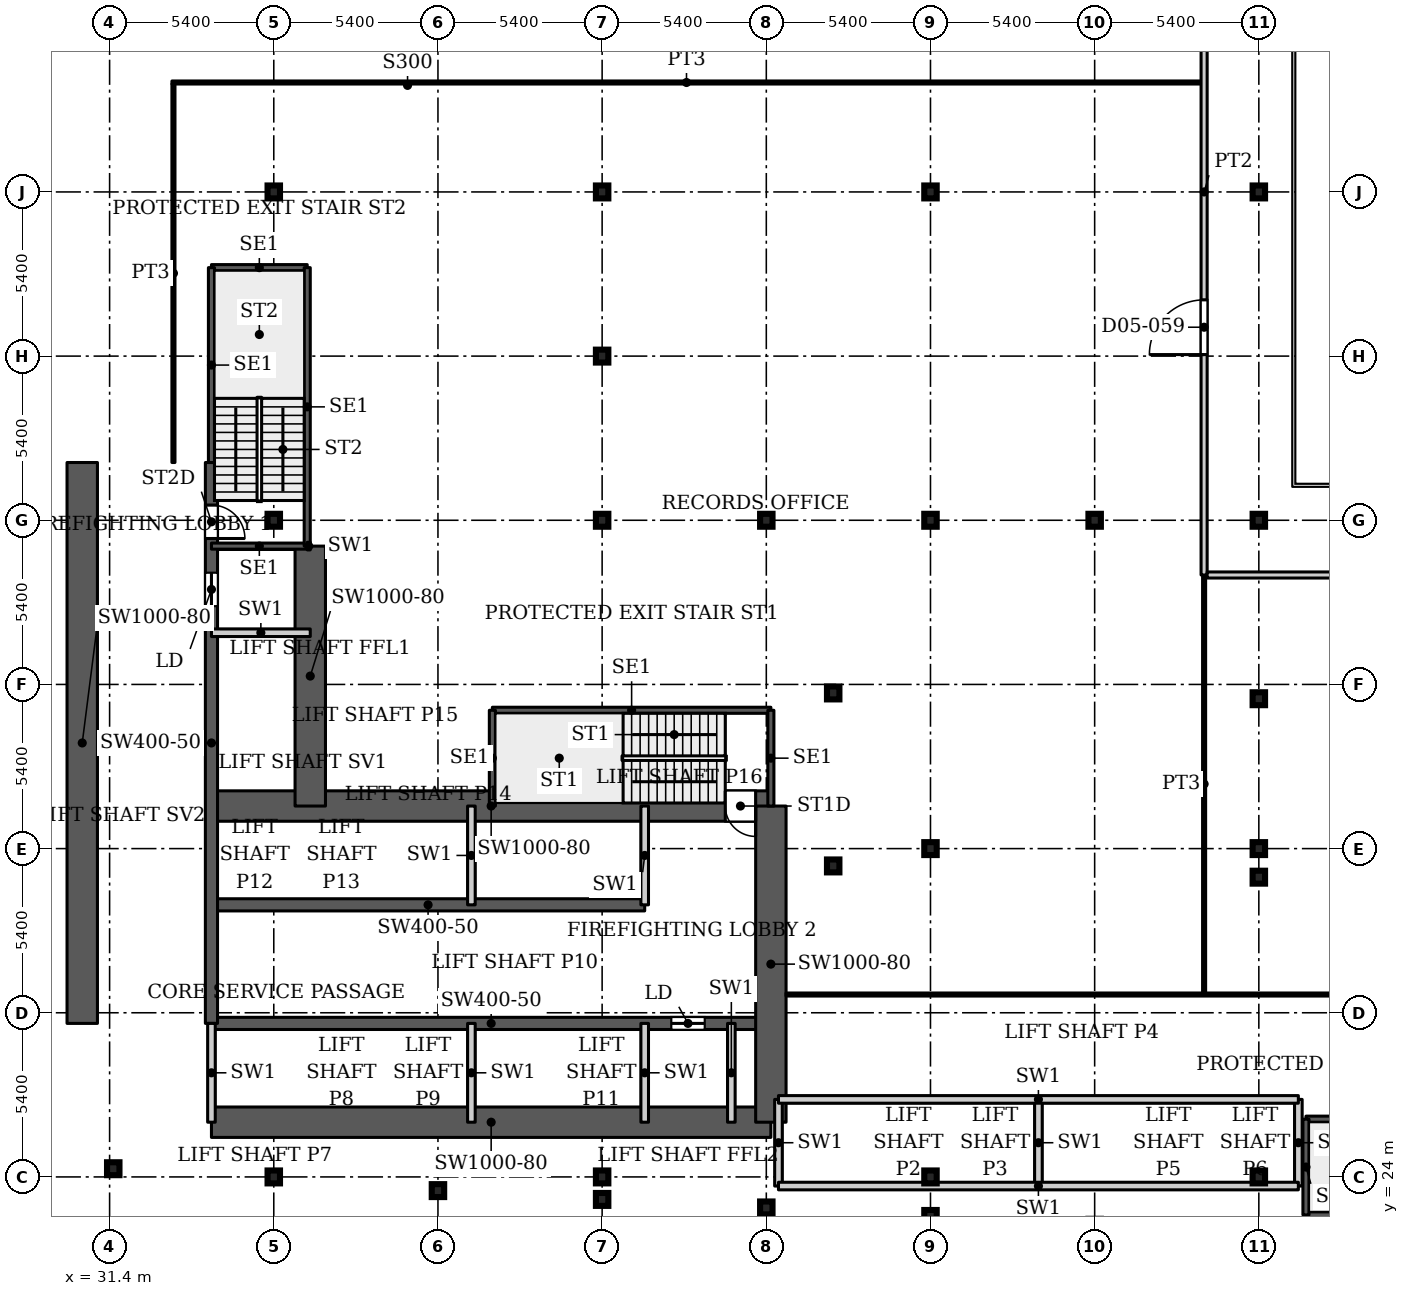
"""IFC4 building model, lengths in metres.
Left out: names, types, materials, properties, quantities, classifications, styles, units other than length and angle.
Written with IfcOpenShell. Run it as: python <this file> out.ifc"""

import sys

from ifc_helpers import new_model, si_unit, direction, frame, frame_2d, origin, origin_2d, place, context, subcontext, project, spatial, rectangle, i_section, extrude, source, transform, mapped, element, fill, save


model = new_model("IFC4")
c1 = context("Model", 3, precision=1e-05, world=origin(), true_north=direction((0.0, 1.0)))
c2 = subcontext(c1, "Body", "Model", "MODEL_VIEW")
j1 = project(units=[si_unit("LENGTHUNIT", "METRE"), si_unit("PLANEANGLEUNIT", "RADIAN")], contexts=[c1])
p1 = place(None, origin())
s1 = spatial("IfcSite", under=j1, at=p1, CompositionType="ELEMENT")
p2 = place(p1, origin())
s2 = spatial("IfcBuilding", under=s1, at=p2, CompositionType="ELEMENT")
p3 = place(p2, frame((0.0, 0.0, 26.0)))
s3 = spatial("IfcBuildingStorey", under=s2, at=p3, CompositionType="ELEMENT", Elevation=26.0)
for number, where, z_axis, x_axis in (
    (1, (36.8, 24.0, 0.0), (0.0, 0.0, 1.0), (1.0, 0.0, 0.0)),
    (2, (47.6, 24.0, 0.0), (0.0, 0.0, 1.0), (1.0, 0.0, 0.0)),
    (3, (58.4, 24.0, 0.0), (0.0, 0.0, 1.0), (1.0, 0.0, 0.0)),
    (4, (69.2, 24.0, 0.0), (0.0, 0.0, 1.0), (1.0, 0.0, 0.0)),
    (5, (58.4, 34.8, 0.0), (0.0, 0.0, 1.0), (1.0, 0.0, 0.0)),
    (6, (69.2, 34.8, 0.0), (0.0, 0.0, 1.0), (1.0, 0.0, 0.0)),
    (7, (36.8, 45.6, 0.0), (0.0, 0.0, 1.0), (1.0, 0.0, 0.0)),
    (8, (47.6, 45.6, 0.0), (0.0, 0.0, 1.0), (1.0, 0.0, 0.0)),
    (9, (58.4, 45.6, 0.0), (0.0, 0.0, 1.0), (1.0, 0.0, 0.0)),
    (10, (69.2, 45.6, 0.0), (0.0, 0.0, 1.0), (1.0, 0.0, 0.0)),
    (11, (36.8, 56.4, 0.0), (0.0, 0.0, 1.0), (1.0, 0.0, 0.0)),
    (12, (47.6, 56.4, 0.0), (0.0, 0.0, 1.0), (1.0, 0.0, 0.0)),
    (13, (58.4, 56.4, 0.0), (0.0, 0.0, 1.0), (1.0, 0.0, 0.0)),
    (14, (69.2, 56.4, 0.0), (0.0, 0.0, 1.0), (1.0, 0.0, 0.0)),
    (15, (58.4, 22.7, 0.0), (0.0, 0.0, 1.0), (1.0, 0.0, 0.0)),
    (16, (53.0, 22.98, 0.0), (0.0, 0.0, 1.0), (1.0, 0.0, 0.0)),
    (17, (47.6, 23.26, 0.0), (0.0, 0.0, 1.0), (1.0, 0.0, 0.0)),
    (18, (42.2, 23.55, 0.0), (0.0, 0.0, 1.0), (1.0, 0.0, 0.0)),
    (19, (31.52, 24.27, 0.0), (0.0, 0.0, 1.0), (1.0, 0.0, 0.0)),
    (20, (53.0, 45.6, 0.0), (0.0, 0.0, 1.0), (1.0, 0.0, 0.0)),
    (21, (63.8, 45.6, 0.0), (0.0, 0.0, 1.0), (1.0, 0.0, 0.0)),
    (22, (47.6, 51.0, 0.0), (0.0, 0.0, 1.0), (1.0, 0.0, 0.0)),
    (23, (69.2, 33.86, 0.0), (0.0, 0.0, 1.0), (1.0, 0.0, 0.0)),
    (24, (55.2, 34.23, 0.0), (0.0, 0.0, 1.0), (1.0, 0.0, 0.0)),
    (25, (69.2, 39.73, 0.0), (0.0, 0.0, 1.0), (1.0, 0.0, 0.0)),
    (26, (55.2, 39.92, 0.0), (0.0, 0.0, 1.0), (1.0, 0.0, 0.0)),
):
    element("IfcColumn", number, at=place(p3, frame(where, z_axis=z_axis, x_axis=x_axis)), inside=s3, PredefinedType="COLUMN", context=c2, shape_type="SweptSolid", body=[
        extrude(i_section(OverallWidth=0.409, OverallDepth=0.425, WebThickness=0.033, FlangeThickness=0.052, FilletRadius=0.013, at=origin_2d()), origin(), (0.0, 0.0, 1.0), 4.5),
    ])
p4 = place(p3, frame((34.75, 25.8, 0.0), z_axis=(0.0, 0.0, 1.0), x_axis=(1.0, 0.0, 0.0)))
e27 = element("IfcWall", 27, at=p4, inside=s3, PredefinedType="SHEAR", context=c2, shape_type="SweptSolid", body=[
    extrude(rectangle(XDim=18.4, YDim=1.0, at=frame_2d((9.2, 0.0))), origin(), (0.0, 0.0, 1.0), 4.5),
])
p5 = place(p3, frame((34.75, 29.05, 0.0), z_axis=(0.0, 0.0, 1.0), x_axis=(1.0, 0.0, 0.0)))
e28 = element("IfcWall", 28, at=p5, inside=s3, PredefinedType="SHEAR", context=c2, shape_type="SweptSolid", body=[
    extrude(rectangle(XDim=18.4, YDim=0.4, at=frame_2d((9.2, 0.0))), origin(), (0.0, 0.0, 1.0), 4.5),
])
p6 = place(p5, frame((15.125, 0.0, 0.0)))
e29 = element("IfcOpeningElement", 29, at=p6, cuts=e28, PredefinedType="OPENING", context=c2, shape_type="SweptSolid", body=[
    extrude(rectangle(XDim=1.1, YDim=2.2, at=frame_2d((0.55, 1.1))), frame((0.0, 0.21, 0.0), z_axis=(0.0, -1.0, 0.0), x_axis=(1.0, 0.0, 0.0)), (0.0, 0.0, 1.0), 0.42),
])
p7 = place(p3, frame((34.75, 32.95, 0.0), z_axis=(0.0, 0.0, 1.0), x_axis=(1.0, 0.0, 0.0)))
e30 = element("IfcWall", 30, at=p7, inside=s3, PredefinedType="SHEAR", context=c2, shape_type="SweptSolid", body=[
    extrude(rectangle(XDim=14.25, YDim=0.4, at=frame_2d((7.125, 0.0))), origin(), (0.0, 0.0, 1.0), 4.5),
])
p8 = place(p3, frame((34.75, 36.2, 0.0), z_axis=(0.0, 0.0, 1.0), x_axis=(1.0, 0.0, 0.0)))
e31 = element("IfcWall", 31, at=p8, inside=s3, PredefinedType="SHEAR", context=c2, shape_type="SweptSolid", body=[
    extrude(rectangle(XDim=18.4, YDim=1.0, at=frame_2d((9.2, 0.0))), origin(), (0.0, 0.0, 1.0), 4.5),
])
p9 = place(p8, frame((16.9, 0.0, 0.0)))
e32 = element("IfcOpeningElement", 32, at=p9, cuts=e31, PredefinedType="OPENING", context=c2, shape_type="SweptSolid", body=[
    extrude(rectangle(XDim=1.0, YDim=2.2, at=frame_2d((0.5, 1.1))), frame((0.0, 0.51, 0.0), z_axis=(0.0, -1.0, 0.0), x_axis=(1.0, 0.0, 0.0)), (0.0, 0.0, 1.0), 1.02),
])
p10 = place(p3, frame((34.75, 29.05, 0.0), z_axis=(0.0, 0.0, 1.0), x_axis=(0.0, 1.0, 0.0)))
e33 = element("IfcWall", 33, at=p10, inside=s3, PredefinedType="SHEAR", context=c2, shape_type="SweptSolid", body=[
    extrude(rectangle(XDim=18.45, YDim=0.4, at=frame_2d((9.225, 0.0))), origin(), (0.0, 0.0, 1.0), 4.5),
])
p11 = place(p10, frame((13.725, 0.0, 0.0)))
e34 = element("IfcOpeningElement", 34, at=p11, cuts=e33, PredefinedType="OPENING", context=c2, shape_type="SweptSolid", body=[
    extrude(rectangle(XDim=1.1, YDim=2.2, at=frame_2d((0.55, 1.1))), frame((0.0, 0.21, 0.0), z_axis=(0.0, -1.0, 0.0), x_axis=(1.0, 0.0, 0.0)), (0.0, 0.0, 1.0), 0.42),
])
p12 = place(p10, frame((15.95, 0.0, 0.0)))
e35 = element("IfcOpeningElement", 35, at=p12, cuts=e33, PredefinedType="OPENING", context=c2, shape_type="SweptSolid", body=[
    extrude(rectangle(XDim=1.1, YDim=2.2, at=frame_2d((0.55, 1.1))), frame((0.0, 0.21, 0.0), z_axis=(0.0, -1.0, 0.0), x_axis=(1.0, 0.0, 0.0)), (0.0, 0.0, 1.0), 0.42),
])
p13 = place(p3, frame((38.0, 36.2, 0.0), z_axis=(0.0, 0.0, 1.0), x_axis=(0.0, 1.0, 0.0)))
e36 = element("IfcWall", 36, at=p13, inside=s3, PredefinedType="SHEAR", context=c2, shape_type="SweptSolid", body=[
    extrude(rectangle(XDim=8.55, YDim=1.0, at=frame_2d((4.275, 0.0))), origin(), (0.0, 0.0, 1.0), 4.5),
])
p14 = place(p3, frame((30.5, 29.05, 0.0), z_axis=(0.0, 0.0, 1.0), x_axis=(0.0, 1.0, 0.0)))
e37 = element("IfcWall", 37, at=p14, inside=s3, PredefinedType="SHEAR", context=c2, shape_type="SweptSolid", body=[
    extrude(rectangle(XDim=18.45, YDim=1.0, at=frame_2d((9.225, 0.0))), origin(), (0.0, 0.0, 1.0), 4.5),
])
p15 = place(p3, frame((53.15, 25.8, 0.0), z_axis=(0.0, 0.0, 1.0), x_axis=(0.0, 1.0, 0.0)))
e38 = element("IfcWall", 38, at=p15, inside=s3, PredefinedType="SHEAR", context=c2, shape_type="SweptSolid", body=[
    extrude(rectangle(XDim=10.4, YDim=1.0, at=frame_2d((5.2, 0.0))), origin(), (0.0, 0.0, 1.0), 4.5),
])
p16 = place(p3, frame((43.99, 39.35, 0.0), z_axis=(0.0, 0.0, 1.0), x_axis=(1.0, 0.0, 0.0)))
e39 = element("IfcWall", 39, at=p16, inside=s3, PredefinedType="SHEAR", context=c2, shape_type="SweptSolid", body=[
    extrude(rectangle(XDim=9.16, YDim=0.2, at=frame_2d((4.58, 0.0))), origin(), (0.0, 0.0, 1.0), 4.5),
])
for number, where, z_axis, x_axis in (
    (40, (43.99, 36.2, 0.0), (0.0, 0.0, 1.0), (0.0, 1.0, 0.0)),
    (41, (53.15, 36.2, 0.0), (0.0, 0.0, 1.0), (0.0, 1.0, 0.0)),
):
    element("IfcWall", number, at=place(p3, frame(where, z_axis=z_axis, x_axis=x_axis)), inside=s3, PredefinedType="SHEAR", context=c2, shape_type="SweptSolid", body=[
        extrude(rectangle(XDim=3.15, YDim=0.2, at=frame_2d((1.575, 0.0))), origin(), (0.0, 0.0, 1.0), 4.5),
    ])
for number, where, z_axis, x_axis in (
    (42, (34.75, 44.75, 0.0), (0.0, 0.0, 1.0), (1.0, 0.0, 0.0)),
    (43, (34.75, 53.91, 0.0), (0.0, 0.0, 1.0), (1.0, 0.0, 0.0)),
):
    element("IfcWall", number, at=place(p3, frame(where, z_axis=z_axis, x_axis=x_axis)), inside=s3, PredefinedType="SHEAR", context=c2, shape_type="SweptSolid", body=[
        extrude(rectangle(XDim=3.15, YDim=0.2, at=frame_2d((1.575, 0.0))), origin(), (0.0, 0.0, 1.0), 4.5),
    ])
p17 = place(p3, frame((34.75, 47.5, 0.0), z_axis=(0.0, 0.0, 1.0), x_axis=(0.0, 1.0, 0.0)))
e44 = element("IfcWall", 44, at=p17, inside=s3, PredefinedType="SHEAR", context=c2, shape_type="SweptSolid", body=[
    extrude(rectangle(XDim=6.41, YDim=0.2, at=frame_2d((3.205, 0.0))), origin(), (0.0, 0.0, 1.0), 4.5),
])
for number, where, z_axis, x_axis in (
    (45, (37.9, 44.75, 0.0), (0.0, 0.0, 1.0), (0.0, 1.0, 0.0)),
    (46, (70.75, 22.75, 0.0), (0.0, 0.0, 1.0), (1.0, 0.0, 0.0)),
    (47, (70.75, 25.9, 0.0), (0.0, 0.0, 1.0), (1.0, 0.0, 0.0)),
):
    element("IfcWall", number, at=place(p3, frame(where, z_axis=z_axis, x_axis=x_axis)), inside=s3, PredefinedType="SHEAR", context=c2, shape_type="SweptSolid", body=[
        extrude(rectangle(XDim=9.16, YDim=0.2, at=frame_2d((4.58, 0.0))), origin(), (0.0, 0.0, 1.0), 4.5),
    ])
p18 = place(p3, frame((70.75, 22.75, 0.0), z_axis=(0.0, 0.0, 1.0), x_axis=(0.0, 1.0, 0.0)))
e48 = element("IfcWall", 48, at=p18, inside=s3, PredefinedType="SHEAR", context=c2, shape_type="SweptSolid", body=[
    extrude(rectangle(XDim=3.15, YDim=0.2, at=frame_2d((1.575, 0.0))), origin(), (0.0, 0.0, 1.0), 4.5),
])
for number, where, z_axis, x_axis in (
    (49, (34.75, 25.8, 0.0), (0.0, 0.0, 1.0), (0.0, 1.0, 0.0)),
    (50, (43.3, 25.8, 0.0), (0.0, 0.0, 1.0), (0.0, 1.0, 0.0)),
    (51, (43.3, 32.95, 0.0), (0.0, 0.0, 1.0), (0.0, 1.0, 0.0)),
    (52, (49.0, 25.8, 0.0), (0.0, 0.0, 1.0), (0.0, 1.0, 0.0)),
    (53, (49.0, 32.95, 0.0), (0.0, 0.0, 1.0), (0.0, 1.0, 0.0)),
    (54, (51.85, 25.8, 0.0), (0.0, 0.0, 1.0), (0.0, 1.0, 0.0)),
):
    element("IfcWall", number, at=place(p3, frame(where, z_axis=z_axis, x_axis=x_axis)), inside=s3, PredefinedType="PARTITIONING", context=c2, shape_type="SweptSolid", body=[
        extrude(rectangle(XDim=3.25, YDim=0.25, at=frame_2d((1.625, 0.0))), origin(), (0.0, 0.0, 1.0), 4.5),
    ])
for number, where, z_axis, x_axis in (
    (55, (53.4, 23.7, 0.0), (0.0, 0.0, 1.0), (0.0, 1.0, 0.0)),
    (56, (61.95, 23.7, 0.0), (0.0, 0.0, 1.0), (0.0, 1.0, 0.0)),
    (57, (70.5, 23.7, 0.0), (0.0, 0.0, 1.0), (0.0, 1.0, 0.0)),
):
    element("IfcWall", number, at=place(p3, frame(where, z_axis=z_axis, x_axis=x_axis)), inside=s3, PredefinedType="PARTITIONING", context=c2, shape_type="SweptSolid", body=[
        extrude(rectangle(XDim=2.85, YDim=0.25, at=frame_2d((1.425, 0.0))), origin(), (0.0, 0.0, 1.0), 4.5),
    ])
for number, where, z_axis, x_axis in (
    (58, (53.4, 23.7, 0.0), (0.0, 0.0, 1.0), (1.0, 0.0, 0.0)),
    (59, (53.4, 26.55, 0.0), (0.0, 0.0, 1.0), (1.0, 0.0, 0.0)),
):
    element("IfcWall", number, at=place(p3, frame(where, z_axis=z_axis, x_axis=x_axis)), inside=s3, PredefinedType="PARTITIONING", context=c2, shape_type="SweptSolid", body=[
        extrude(rectangle(XDim=17.1, YDim=0.25, at=frame_2d((8.55, 0.0))), origin(), (0.0, 0.0, 1.0), 4.5),
    ])
p19 = place(p3, frame((34.75, 41.9, 0.0), z_axis=(0.0, 0.0, 1.0), x_axis=(1.0, 0.0, 0.0)))
e60 = element("IfcWall", 60, at=p19, inside=s3, PredefinedType="PARTITIONING", context=c2, shape_type="SweptSolid", body=[
    extrude(rectangle(XDim=3.25, YDim=0.25, at=frame_2d((1.625, 0.0))), origin(), (0.0, 0.0, 1.0), 4.5),
])
p20 = place(p3, frame((37.9, 44.75, 0.0), z_axis=(0.0, 0.0, 1.0), x_axis=(1.0, 0.0, 0.0)))
e61 = element("IfcWall", 61, at=p20, inside=s3, PredefinedType="PARTITIONING", context=c2, shape_type="SweptSolid", body=[
    extrude(rectangle(XDim=0.1, YDim=0.25, at=frame_2d((0.05, 0.0))), origin(), (0.0, 0.0, 1.0), 4.5),
])
p21 = place(p3, frame((33.45, 60.0, 0.0), z_axis=(0.0, 0.0, 1.0), x_axis=(1.0, 0.0, 0.0)))
e62 = element("IfcWall", 62, at=p21, inside=s3, PredefinedType="PARTITIONING", context=c2, shape_type="SweptSolid", body=[
    extrude(rectangle(XDim=33.85, YDim=0.1, at=frame_2d((16.925, 0.0))), origin(), (0.0, 0.0, 1.0), 4.2),
])
p22 = place(p3, frame((33.5, 47.5, 0.0), z_axis=(0.0, 0.0, 1.0), x_axis=(0.0, 1.0, 0.0)))
e63 = element("IfcWall", 63, at=p22, inside=s3, PredefinedType="PARTITIONING", context=c2, shape_type="SweptSolid", body=[
    extrude(rectangle(XDim=12.45, YDim=0.1, at=frame_2d((6.225, 0.0))), origin(), (0.0, 0.0, 1.0), 4.2),
])
p23 = place(p3, frame((53.649, 30.0, 0.0), z_axis=(0.0, 0.0, 1.0), x_axis=(1.0, 0.0, 0.0)))
e64 = element("IfcWall", 64, at=p23, inside=s3, PredefinedType="PARTITIONING", context=c2, shape_type="SweptSolid", body=[
    extrude(rectangle(XDim=38.301, YDim=0.1, at=frame_2d((19.15, 0.0))), origin(), (0.0, 0.0, 1.0), 4.2),
])
p24 = place(p3, frame((67.4, 30.05, 0.0), z_axis=(0.0, 0.0, 1.0), x_axis=(0.0, 1.0, 0.0)))
e65 = element("IfcWall", 65, at=p24, inside=s3, PredefinedType="PARTITIONING", context=c2, shape_type="SweptSolid", body=[
    extrude(rectangle(XDim=13.75, YDim=0.1, at=frame_2d((6.875, 0.0))), origin(), (0.0, 0.0, 1.0), 4.2),
])
p25 = place(p3, frame((67.4, 43.8, 0.0), z_axis=(0.0, 0.0, 1.0), x_axis=(0.0, 1.0, 0.0)))
e66 = element("IfcWall", 66, at=p25, inside=s3, PredefinedType="PARTITIONING", context=c2, shape_type="SweptSolid", body=[
    extrude(rectangle(XDim=25.2, YDim=0.2, at=frame_2d((12.6, 0.0))), origin(), (0.0, 0.0, 1.0), 4.2),
])
p26 = place(p25, frame((7.25, 0.0, 0.0)))
e67 = element("IfcOpeningElement", 67, at=p26, cuts=e66, PredefinedType="OPENING", context=c2, shape_type="SweptSolid", body=[
    extrude(rectangle(XDim=1.8, YDim=2.1, at=frame_2d((0.9, 1.05))), frame((0.0, 0.11, 0.0), z_axis=(0.0, -1.0, 0.0), x_axis=(1.0, 0.0, 0.0)), (0.0, 0.0, 1.0), 0.22),
])
p27 = place(p25, frame((19.75, 0.0, 0.0)))
e68 = element("IfcOpeningElement", 68, at=p27, cuts=e66, PredefinedType="OPENING", context=c2, shape_type="SweptSolid", body=[
    extrude(rectangle(XDim=1.8, YDim=2.1, at=frame_2d((0.9, 1.05))), frame((0.0, 0.11, 0.0), z_axis=(0.0, -1.0, 0.0), x_axis=(1.0, 0.0, 0.0)), (0.0, 0.0, 1.0), 0.22),
])
p28 = place(p3, frame((67.5, 43.8, 0.0), z_axis=(0.0, 0.0, 1.0), x_axis=(1.0, 0.0, 0.0)))
e69 = element("IfcWall", 69, at=p28, inside=s3, PredefinedType="PARTITIONING", context=c2, shape_type="SweptSolid", body=[
    extrude(rectangle(XDim=24.4, YDim=0.2, at=frame_2d((12.2, 0.0))), origin(), (0.0, 0.0, 1.0), 4.2),
])
p29 = place(p28, frame((11.3, 0.0, 0.0)))
e70 = element("IfcOpeningElement", 70, at=p29, cuts=e69, PredefinedType="OPENING", context=c2, shape_type="SweptSolid", body=[
    extrude(rectangle(XDim=1.8, YDim=2.1, at=frame_2d((0.9, 1.05))), frame((0.0, 0.11, 0.0), z_axis=(0.0, -1.0, 0.0), x_axis=(1.0, 0.0, 0.0)), (0.0, 0.0, 1.0), 0.22),
])
m1 = source(origin(), c2, "Body", "SweptSolid", [
    extrude(rectangle(XDim=1.1, YDim=2.2, at=frame_2d((0.55, 1.1))), frame((0.0, 0.025, 0.0), z_axis=(0.0, -1.0, 0.0), x_axis=(1.0, 0.0, 0.0)), (0.0, 0.0, 1.0), 0.05),
])
p30 = place(p11, origin())
e71 = element("IfcDoor", 71, at=p30, inside=s3, OperationType="SLIDING_TO_LEFT", PredefinedType="DOOR", context=c2, shape_type="MappedRepresentation", body=[
    mapped(m1, transform((0.0, 0.0, 0.0), x_axis=(1.0, 0.0, 0.0), y_axis=(0.0, 1.0, 0.0), z_axis=(0.0, 0.0, 1.0), scale=1.0)),
])
fill(e34, e71)
p31 = place(p6, origin())
e72 = element("IfcDoor", 72, at=p31, inside=s3, OperationType="SLIDING_TO_LEFT", PredefinedType="DOOR", context=c2, shape_type="MappedRepresentation", body=[
    mapped(m1, transform((0.0, 0.0, 0.0), x_axis=(1.0, 0.0, 0.0), y_axis=(0.0, 1.0, 0.0), z_axis=(0.0, 0.0, 1.0), scale=1.0)),
])
fill(e29, e72)
m2 = source(origin(), c2, "Body", "SweptSolid", [
    extrude(rectangle(XDim=1.0, YDim=2.2, at=frame_2d((0.5, 1.1))), frame((0.0, 0.025, 0.0), z_axis=(0.0, -1.0, 0.0), x_axis=(1.0, 0.0, 0.0)), (0.0, 0.0, 1.0), 0.05),
])
p32 = place(p9, origin())
e73 = element("IfcDoor", 73, at=p32, inside=s3, OperationType="SINGLE_SWING_RIGHT", PredefinedType="DOOR", context=c2, shape_type="MappedRepresentation", body=[
    mapped(m2, transform((0.0, 0.0, 0.0), x_axis=(1.0, 0.0, 0.0), y_axis=(0.0, 1.0, 0.0), z_axis=(0.0, 0.0, 1.0), scale=1.0)),
])
fill(e32, e73)
m3 = source(origin(), c2, "Body", "SweptSolid", [
    extrude(rectangle(XDim=1.1, YDim=2.2, at=frame_2d((0.55, 1.1))), frame((0.0, 0.025, 0.0), z_axis=(0.0, -1.0, 0.0), x_axis=(1.0, 0.0, 0.0)), (0.0, 0.0, 1.0), 0.05),
])
p33 = place(p12, origin())
e74 = element("IfcDoor", 74, at=p33, inside=s3, OperationType="SINGLE_SWING_RIGHT", PredefinedType="DOOR", context=c2, shape_type="MappedRepresentation", body=[
    mapped(m3, transform((0.0, 0.0, 0.0), x_axis=(1.0, 0.0, 0.0), y_axis=(0.0, 1.0, 0.0), z_axis=(0.0, 0.0, 1.0), scale=1.0)),
])
fill(e35, e74)
m4 = source(origin(), c2, "Body", "SweptSolid", [
    extrude(rectangle(XDim=1.8, YDim=2.1, at=frame_2d((0.9, 1.05))), frame((0.0, 0.025, 0.0), z_axis=(0.0, -1.0, 0.0), x_axis=(1.0, 0.0, 0.0)), (0.0, 0.0, 1.0), 0.05),
])
p34 = place(p26, origin())
e75 = element("IfcDoor", 75, at=p34, inside=s3, OperationType="DOUBLE_DOOR_SINGLE_SWING", PredefinedType="DOOR", context=c2, shape_type="MappedRepresentation", body=[
    mapped(m4, transform((0.0, 0.0, 0.0), x_axis=(1.0, 0.0, 0.0), y_axis=(0.0, 1.0, 0.0), z_axis=(0.0, 0.0, 1.0), scale=1.0)),
])
fill(e67, e75)
save(model, sys.argv[1])
